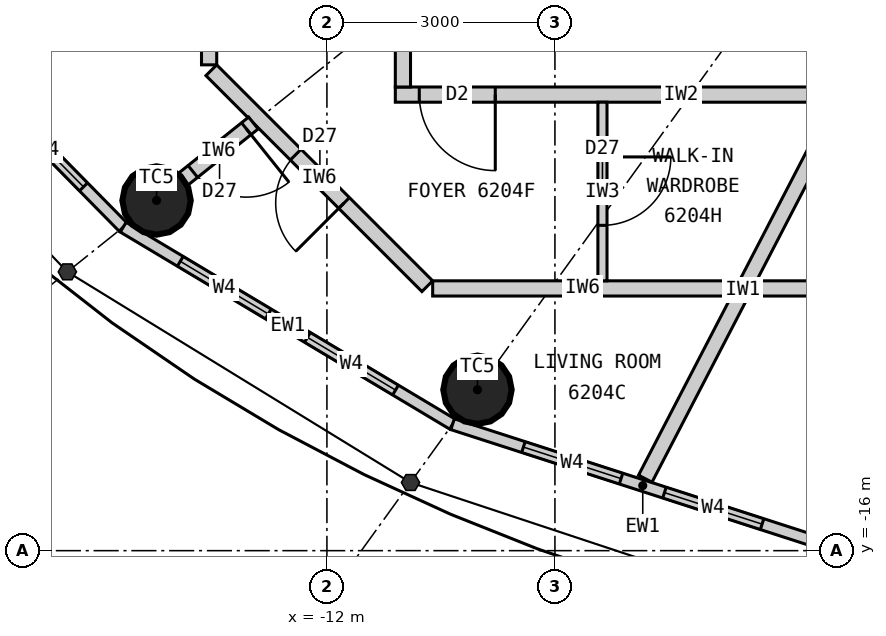
"""IFC4 building model, lengths in metres.
Left out: names, types, materials, properties, quantities, classifications, styles, units other than length and angle.
Written with IfcOpenShell. Run it as: python <this file> out.ifc"""

import sys

from ifc_helpers import new_model, si_unit, direction, frame, frame_2d, origin, origin_2d, place, context, subcontext, project, spatial, rectangle, circle, extrude, clip, halfspace, element, fill, save


model = new_model("IFC4")
c1 = context("Model", 3, precision=1e-05, world=origin(), true_north=direction((0.0, 1.0)))
c2 = subcontext(c1, "Body", "Model", "MODEL_VIEW")
j1 = project(units=[si_unit("LENGTHUNIT", "METRE"), si_unit("PLANEANGLEUNIT", "RADIAN")], contexts=[c1])
p1 = place(None, origin())
s1 = spatial("IfcSite", under=j1, at=p1, CompositionType="ELEMENT")
p2 = place(p1, origin())
s2 = spatial("IfcBuilding", under=s1, at=p2, CompositionType="ELEMENT")
p3 = place(p2, frame((0.0, 0.0, 229.2)))
s3 = spatial("IfcBuildingStorey", under=s2, at=p3, CompositionType="ELEMENT", Elevation=229.2)
for number, where, z_axis, x_axis in (
    (1, (-14.241, -11.393, 0.0), (0.0, 0.0, 1.0), (1.0, 0.0, 0.0)),
    (2, (-10.019, -13.883, 0.0), (0.0, 0.0, 1.0), (1.0, 0.0, 0.0)),
):
    element("IfcColumn", number, at=place(p3, frame(where, z_axis=z_axis, x_axis=x_axis)), inside=s3, PredefinedType="COLUMN", context=c2, shape_type="Clipping", body=[
        clip(extrude(circle(Radius=0.45, at=origin_2d()), origin(), (0.0, 0.0, 1.0), 3.3), halfspace(frame((0.0, 0.0, 2.25), z_axis=(0.0, 0.0, 1.0), x_axis=(1.0, 0.0, 0.0)), False)),
    ])
p4 = place(p3, frame((-18.04, -8.332, 0.0), z_axis=(0.0, 0.0, 1.0), x_axis=(0.701527379618, -0.712642501993, 0.0)))
e3 = element("IfcWall", 3, at=p4, inside=s3, PredefinedType="ELEMENTEDWALL", context=c2, shape_type="SweptSolid", body=[
    extrude(rectangle(XDim=4.788, YDim=0.15, at=frame_2d((2.394, 0.0))), origin(), (0.0, 0.0, 1.0), 3.05),
])
p5 = place(p4, frame((0.744, 0.0, 0.9)))
e4 = element("IfcOpeningElement", 4, at=p5, cuts=e3, PredefinedType="OPENING", context=c2, shape_type="SweptSolid", body=[
    extrude(rectangle(XDim=1.35, YDim=1.9, at=frame_2d((0.675, 0.95))), frame((0.0, 0.085, 0.0), z_axis=(0.0, -1.0, 0.0), x_axis=(1.0, 0.0, 0.0)), (0.0, 0.0, 1.0), 0.17),
])
p6 = place(p4, frame((2.694, 0.0, 0.9)))
e5 = element("IfcOpeningElement", 5, at=p6, cuts=e3, PredefinedType="OPENING", context=c2, shape_type="SweptSolid", body=[
    extrude(rectangle(XDim=1.35, YDim=1.9, at=frame_2d((0.675, 0.95))), frame((0.0, 0.085, 0.0), z_axis=(0.0, -1.0, 0.0), x_axis=(1.0, 0.0, 0.0)), (0.0, 0.0, 1.0), 0.17),
])
p7 = place(p3, frame((-14.68, -11.744, 0.0), z_axis=(0.0, 0.0, 1.0), x_axis=(0.85822150553, -0.513279502265, 0.0)))
e6 = element("IfcWall", 6, at=p7, inside=s3, PredefinedType="ELEMENTEDWALL", context=c2, shape_type="SweptSolid", body=[
    extrude(rectangle(XDim=5.05, YDim=0.15, at=frame_2d((2.525, 0.0))), origin(), (0.0, 0.0, 1.0), 3.05),
])
p8 = place(p7, frame((0.875, 0.0, 0.9)))
e7 = element("IfcOpeningElement", 7, at=p8, cuts=e6, PredefinedType="OPENING", context=c2, shape_type="SweptSolid", body=[
    extrude(rectangle(XDim=1.35, YDim=1.9, at=frame_2d((0.675, 0.95))), frame((0.0, 0.085, 0.0), z_axis=(0.0, -1.0, 0.0), x_axis=(1.0, 0.0, 0.0)), (0.0, 0.0, 1.0), 0.17),
])
p9 = place(p7, frame((2.825, 0.0, 0.9)))
e8 = element("IfcOpeningElement", 8, at=p9, cuts=e6, PredefinedType="OPENING", context=c2, shape_type="SweptSolid", body=[
    extrude(rectangle(XDim=1.35, YDim=1.9, at=frame_2d((0.675, 0.95))), frame((0.0, 0.085, 0.0), z_axis=(0.0, -1.0, 0.0), x_axis=(1.0, 0.0, 0.0)), (0.0, 0.0, 1.0), 0.17),
])
p10 = place(p3, frame((-10.346, -14.336, 0.0), z_axis=(0.0, 0.0, 1.0), x_axis=(0.951644702515, -0.307200846638, 0.0)))
e9 = element("IfcWall", 9, at=p10, inside=s3, PredefinedType="ELEMENTEDWALL", context=c2, shape_type="SweptSolid", body=[
    extrude(rectangle(XDim=5.258, YDim=0.15, at=frame_2d((2.629, 0.0))), origin(), (0.0, 0.0, 1.0), 3.05),
])
p11 = place(p10, frame((0.979, 0.0, 0.9)))
e10 = element("IfcOpeningElement", 10, at=p11, cuts=e9, PredefinedType="OPENING", context=c2, shape_type="SweptSolid", body=[
    extrude(rectangle(XDim=1.35, YDim=1.9, at=frame_2d((0.675, 0.95))), frame((0.0, 0.085, 0.0), z_axis=(0.0, -1.0, 0.0), x_axis=(1.0, 0.0, 0.0)), (0.0, 0.0, 1.0), 0.17),
])
p12 = place(p10, frame((2.929, 0.0, 0.9)))
e11 = element("IfcOpeningElement", 11, at=p12, cuts=e9, PredefinedType="OPENING", context=c2, shape_type="SweptSolid", body=[
    extrude(rectangle(XDim=1.35, YDim=1.9, at=frame_2d((0.675, 0.95))), frame((0.0, 0.085, 0.0), z_axis=(0.0, -1.0, 0.0), x_axis=(1.0, 0.0, 0.0)), (0.0, 0.0, 1.0), 0.17),
])
p13 = place(p3, frame((-3.579, -10.0, 0.0), z_axis=(0.0, 0.0, 1.0), x_axis=(-1.0, 0.0, 0.0)))
e12 = element("IfcWall", 12, at=p13, inside=s3, PredefinedType="PARTITIONING", context=c2, shape_type="SweptSolid", body=[
    extrude(rectangle(XDim=7.521, YDim=0.2, at=frame_2d((3.761, 0.0))), origin(), (0.0, 0.0, 1.0), 3.05),
])
p14 = place(p13, frame((6.206, 0.0, 0.0)))
e13 = element("IfcOpeningElement", 13, at=p14, cuts=e12, PredefinedType="OPENING", context=c2, shape_type="SweptSolid", body=[
    extrude(rectangle(XDim=1.0, YDim=2.2, at=frame_2d((0.5, 1.1))), frame((0.0, 0.11, 0.0), z_axis=(0.0, -1.0, 0.0), x_axis=(1.0, 0.0, 0.0)), (0.0, 0.0, 1.0), 0.22),
])
p15 = place(p3, frame((-11.0, 9.9, 0.0), z_axis=(0.0, 0.0, 1.0), x_axis=(0.0, -1.0, 0.0)))
e14 = element("IfcWall", 14, at=p15, inside=s3, PredefinedType="PARTITIONING", context=c2, shape_type="SweptSolid", body=[
    extrude(rectangle(XDim=19.8, YDim=0.2, at=frame_2d((9.9, 0.0))), origin(), (0.0, 0.0, 1.0), 3.05),
])
p16 = place(p15, frame((11.444, 0.0, 0.0)))
e15 = element("IfcOpeningElement", 15, at=p16, cuts=e14, PredefinedType="OPENING", context=c2, shape_type="SweptSolid", body=[
    extrude(rectangle(XDim=1.0, YDim=2.2, at=frame_2d((0.5, 1.1))), frame((0.0, 0.11, 0.0), z_axis=(0.0, -1.0, 0.0), x_axis=(1.0, 0.0, 0.0)), (0.0, 0.0, 1.0), 0.22),
])
p17 = place(p3, frame((-5.241, -10.1, 0.0), z_axis=(0.0, 0.0, 1.0), x_axis=(-0.460603196597, -0.887606160008, 0.0)))
e16 = element("IfcWall", 16, at=p17, inside=s3, PredefinedType="PARTITIONING", context=c2, shape_type="SweptSolid", body=[
    extrude(rectangle(XDim=5.58, YDim=0.2, at=frame_2d((2.79, 0.0))), origin(), (0.0, 0.0, 1.0), 3.05),
])
p18 = place(p3, frame((-13.55, -4.6, 0.0), z_axis=(0.0, 0.0, 1.0), x_axis=(0.0, -1.0, 0.0)))
e17 = element("IfcWall", 17, at=p18, inside=s3, PredefinedType="PARTITIONING", context=c2, shape_type="SweptSolid", body=[
    extrude(rectangle(XDim=5.009, YDim=0.2, at=frame_2d((2.504, 0.0))), origin(), (0.0, 0.0, 1.0), 3.05),
])
p19 = place(p18, frame((0.774, 0.0, 0.0)))
e18 = element("IfcOpeningElement", 18, at=p19, cuts=e17, PredefinedType="OPENING", context=c2, shape_type="SweptSolid", body=[
    extrude(rectangle(XDim=0.8, YDim=2.1, at=frame_2d((0.4, 1.05))), frame((0.0, 0.11, 0.0), z_axis=(0.0, -1.0, 0.0), x_axis=(1.0, 0.0, 0.0)), (0.0, 0.0, 1.0), 0.22),
])
p20 = place(p3, frame((-13.521, -9.679, 0.0), z_axis=(0.0, 0.0, 1.0), x_axis=(0.707106781187, -0.707106781187, 0.0)))
e19 = element("IfcWall", 19, at=p20, inside=s3, PredefinedType="PARTITIONING", context=c2, shape_type="SweptSolid", body=[
    extrude(rectangle(XDim=4.019, YDim=0.2, at=frame_2d((2.009, 0.0))), origin(), (0.0, 0.0, 1.0), 3.05),
])
p21 = place(p20, frame((1.57, 0.0, 0.0)))
e20 = element("IfcOpeningElement", 20, at=p21, cuts=e19, PredefinedType="OPENING", context=c2, shape_type="SweptSolid", body=[
    extrude(rectangle(XDim=0.9, YDim=2.1, at=frame_2d((0.45, 1.05))), frame((0.0, 0.11, 0.0), z_axis=(0.0, -1.0, 0.0), x_axis=(1.0, 0.0, 0.0)), (0.0, 0.0, 1.0), 0.22),
])
p22 = place(p3, frame((-10.609, -12.55, 0.0), z_axis=(0.0, 0.0, 1.0), x_axis=(1.0, 0.0, 0.0)))
e21 = element("IfcWall", 21, at=p22, inside=s3, PredefinedType="PARTITIONING", context=c2, shape_type="SweptSolid", body=[
    extrude(rectangle(XDim=3.947, YDim=0.2, at=frame_2d((1.974, 0.0))), origin(), (0.0, 0.0, 1.0), 3.05),
])
p23 = place(p3, frame((-12.968, -10.374, 0.0), z_axis=(0.0, 0.0, 1.0), x_axis=(-0.780888968944, -0.624669847345, 0.0)))
e22 = element("IfcWall", 22, at=p23, inside=s3, PredefinedType="PARTITIONING", context=c2, shape_type="SweptSolid", body=[
    extrude(rectangle(XDim=1.181, YDim=0.2, at=frame_2d((0.591, 0.0))), origin(), (0.0, 0.0, 1.0), 2.15),
])
p24 = place(p23, frame((0.12, 0.0, 0.0)))
e23 = element("IfcOpeningElement", 23, at=p24, cuts=e22, PredefinedType="OPENING", context=c2, shape_type="SweptSolid", body=[
    extrude(rectangle(XDim=0.9, YDim=2.1, at=frame_2d((0.45, 1.05))), frame((0.0, 0.11, 0.0), z_axis=(0.0, -1.0, 0.0), x_axis=(1.0, 0.0, 0.0)), (0.0, 0.0, 1.0), 0.22),
])
p25 = place(p3, frame((-8.375, -10.1, 0.0), z_axis=(0.0, 0.0, 1.0), x_axis=(0.0, -1.0, 0.0)))
e24 = element("IfcWall", 24, at=p25, inside=s3, PredefinedType="PARTITIONING", context=c2, shape_type="SweptSolid", body=[
    extrude(rectangle(XDim=2.35, YDim=0.12, at=frame_2d((1.175, 0.0))), origin(), (0.0, 0.0, 1.0), 3.05),
])
p26 = place(p25, frame((0.72, 0.0, 0.0)))
e25 = element("IfcOpeningElement", 25, at=p26, cuts=e24, PredefinedType="OPENING", context=c2, shape_type="SweptSolid", body=[
    extrude(rectangle(XDim=0.9, YDim=2.1, at=frame_2d((0.45, 1.05))), frame((0.0, 0.07, 0.0), z_axis=(0.0, -1.0, 0.0), x_axis=(1.0, 0.0, 0.0)), (0.0, 0.0, 1.0), 0.14),
])
p27 = place(p3, frame((-6.364, -12.55, 0.0), z_axis=(0.0, 0.0, 1.0), x_axis=(1.0, 0.0, 0.0)))
e26 = element("IfcWall", 26, at=p27, inside=s3, PredefinedType="PARTITIONING", context=c2, shape_type="SweptSolid", body=[
    extrude(rectangle(XDim=10.446, YDim=0.2, at=frame_2d((5.223, 0.0))), origin(), (0.0, 0.0, 1.0), 3.05),
])
p28 = place(p27, frame((7.202, 0.0, 0.0)))
e27 = element("IfcOpeningElement", 27, at=p28, cuts=e26, PredefinedType="OPENING", context=c2, shape_type="SweptSolid", body=[
    extrude(rectangle(XDim=0.8, YDim=2.1, at=frame_2d((0.4, 1.05))), frame((0.0, 0.11, 0.0), z_axis=(0.0, -1.0, 0.0), x_axis=(1.0, 0.0, 0.0)), (0.0, 0.0, 1.0), 0.22),
])
p29 = place(p27, frame((3.895, 0.0, 0.0)))
e28 = element("IfcOpeningElement", 28, at=p29, cuts=e26, PredefinedType="OPENING", context=c2, shape_type="SweptSolid", body=[
    extrude(rectangle(XDim=0.9, YDim=2.1, at=frame_2d((0.45, 1.05))), frame((0.0, 0.11, 0.0), z_axis=(0.0, -1.0, 0.0), x_axis=(1.0, 0.0, 0.0)), (0.0, 0.0, 1.0), 0.22),
])
p30 = place(p6, origin())
e29 = element("IfcWindow", 29, at=p30, inside=s3, PartitioningType="SINGLE_PANEL", PredefinedType="WINDOW", context=c2, shape_type="SweptSolid", body=[
    extrude(rectangle(XDim=1.35, YDim=1.9, at=frame_2d((0.675, 0.95))), frame((0.0, 0.03, 0.0), z_axis=(0.0, -1.0, 0.0), x_axis=(1.0, 0.0, 0.0)), (0.0, 0.0, 1.0), 0.06),
])
fill(e5, e29)
p31 = place(p8, origin())
e30 = element("IfcWindow", 30, at=p31, inside=s3, PartitioningType="SINGLE_PANEL", PredefinedType="WINDOW", context=c2, shape_type="SweptSolid", body=[
    extrude(rectangle(XDim=1.35, YDim=1.9, at=frame_2d((0.675, 0.95))), frame((0.0, 0.03, 0.0), z_axis=(0.0, -1.0, 0.0), x_axis=(1.0, 0.0, 0.0)), (0.0, 0.0, 1.0), 0.06),
])
fill(e7, e30)
p32 = place(p9, origin())
e31 = element("IfcWindow", 31, at=p32, inside=s3, PartitioningType="SINGLE_PANEL", PredefinedType="WINDOW", context=c2, shape_type="SweptSolid", body=[
    extrude(rectangle(XDim=1.35, YDim=1.9, at=frame_2d((0.675, 0.95))), frame((0.0, 0.03, 0.0), z_axis=(0.0, -1.0, 0.0), x_axis=(1.0, 0.0, 0.0)), (0.0, 0.0, 1.0), 0.06),
])
fill(e8, e31)
p33 = place(p11, origin())
e32 = element("IfcWindow", 32, at=p33, inside=s3, PartitioningType="SINGLE_PANEL", PredefinedType="WINDOW", context=c2, shape_type="SweptSolid", body=[
    extrude(rectangle(XDim=1.35, YDim=1.9, at=frame_2d((0.675, 0.95))), frame((0.0, 0.03, 0.0), z_axis=(0.0, -1.0, 0.0), x_axis=(1.0, 0.0, 0.0)), (0.0, 0.0, 1.0), 0.06),
])
fill(e10, e32)
p34 = place(p12, origin())
e33 = element("IfcWindow", 33, at=p34, inside=s3, PartitioningType="SINGLE_PANEL", PredefinedType="WINDOW", context=c2, shape_type="SweptSolid", body=[
    extrude(rectangle(XDim=1.35, YDim=1.9, at=frame_2d((0.675, 0.95))), frame((0.0, 0.03, 0.0), z_axis=(0.0, -1.0, 0.0), x_axis=(1.0, 0.0, 0.0)), (0.0, 0.0, 1.0), 0.06),
])
fill(e11, e33)
p35 = place(p14, origin())
e34 = element("IfcDoor", 34, at=p35, inside=s3, OperationType="SINGLE_SWING_LEFT", PredefinedType="DOOR", context=c2, shape_type="SweptSolid", body=[
    extrude(rectangle(XDim=1.0, YDim=2.2, at=frame_2d((0.5, 1.1))), frame((0.0, 0.025, 0.0), z_axis=(0.0, -1.0, 0.0), x_axis=(1.0, 0.0, 0.0)), (0.0, 0.0, 1.0), 0.05),
])
fill(e13, e34)
p36 = place(p26, origin())
e35 = element("IfcDoor", 35, at=p36, inside=s3, OperationType="SINGLE_SWING_LEFT", PredefinedType="DOOR", context=c2, shape_type="SweptSolid", body=[
    extrude(rectangle(XDim=0.9, YDim=2.1, at=frame_2d((0.45, 1.05))), frame((0.0, 0.025, 0.0), z_axis=(0.0, -1.0, 0.0), x_axis=(1.0, 0.0, 0.0)), (0.0, 0.0, 1.0), 0.05),
])
fill(e25, e35)
p37 = place(p21, origin())
e36 = element("IfcDoor", 36, at=p37, inside=s3, OperationType="SINGLE_SWING_RIGHT", PredefinedType="DOOR", context=c2, shape_type="SweptSolid", body=[
    extrude(rectangle(XDim=0.9, YDim=2.1, at=frame_2d((0.45, 1.05))), frame((0.0, 0.025, 0.0), z_axis=(0.0, -1.0, 0.0), x_axis=(1.0, 0.0, 0.0)), (0.0, 0.0, 1.0), 0.05),
])
fill(e20, e36)
p38 = place(p24, origin())
e37 = element("IfcDoor", 37, at=p38, inside=s3, OperationType="SINGLE_SWING_LEFT", PredefinedType="DOOR", context=c2, shape_type="SweptSolid", body=[
    extrude(rectangle(XDim=0.9, YDim=2.1, at=frame_2d((0.45, 1.05))), frame((0.0, 0.025, 0.0), z_axis=(0.0, -1.0, 0.0), x_axis=(1.0, 0.0, 0.0)), (0.0, 0.0, 1.0), 0.05),
])
fill(e23, e37)
save(model, sys.argv[1])
